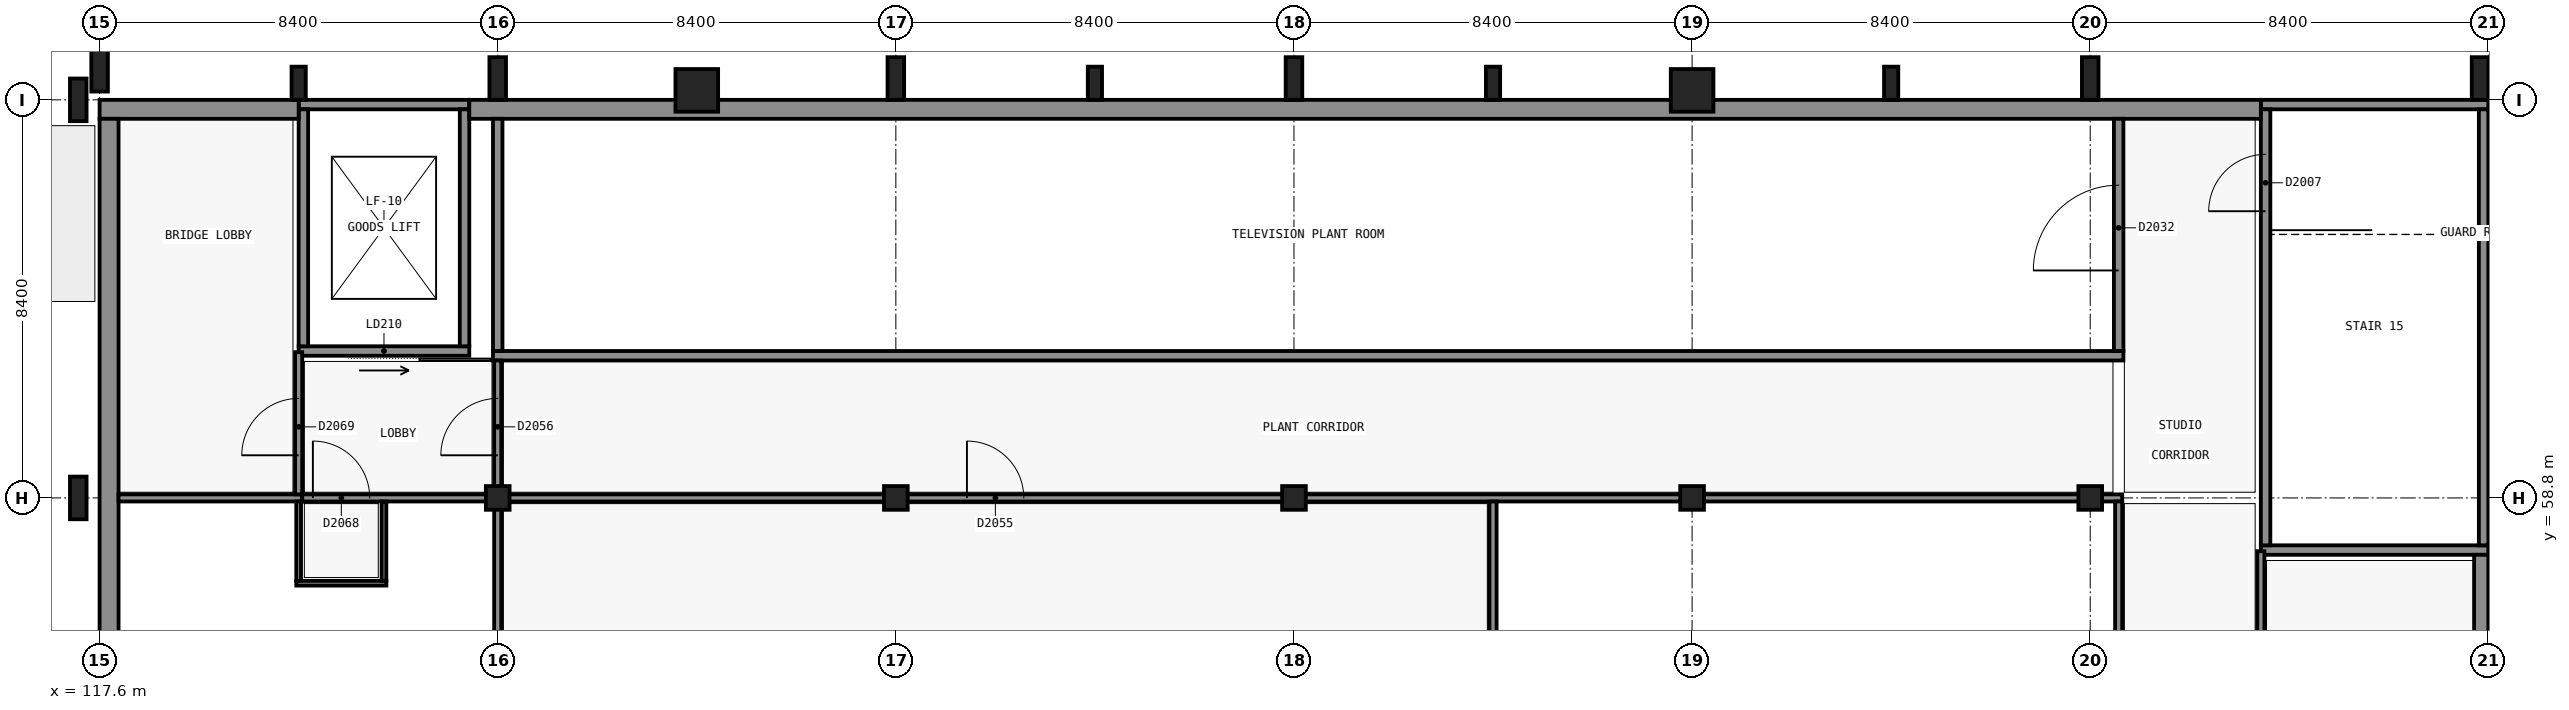
"""IFC4 building model, lengths in metres.
Left out: names, types, materials, properties, quantities, classifications, styles, units other than length and angle.
Written with IfcOpenShell. Run it as: python <this file> out.ifc"""

import sys

from ifc_helpers import new_model, si_unit, direction, frame, frame_2d, origin, origin_2d, place, context, subcontext, project, spatial, rectangle, extrude, element, fill, save


model = new_model("IFC4")
c1 = context("Model", 3, precision=1e-05, world=origin(), true_north=direction((0.0, 1.0)))
c2 = subcontext(c1, "Body", "Model", "MODEL_VIEW")
j1 = project(units=[si_unit("LENGTHUNIT", "METRE"), si_unit("PLANEANGLEUNIT", "RADIAN")], contexts=[c1])
p1 = place(None, origin())
s1 = spatial("IfcSite", under=j1, at=p1, CompositionType="ELEMENT")
p2 = place(p1, origin())
s2 = spatial("IfcBuilding", under=s1, at=p2, CompositionType="ELEMENT")
p3 = place(p2, frame((0.0, 0.0, 10.2)))
s3 = spatial("IfcBuildingStorey", under=s2, at=p3, CompositionType="ELEMENT", Elevation=10.2)
for number, where, z_axis, x_axis in (
    (1, (168.0, 57.7, 0.0), (0.0, 0.0, 1.0), (-1.0, 0.0, 0.0)),
    (2, (163.2, 67.1, 0.0), (0.0, 0.0, 1.0), (1.0, 0.0, 0.0)),
):
    element("IfcWall", number, at=place(p3, frame(where, z_axis=z_axis, x_axis=x_axis)), inside=s3, PredefinedType="SHEAR", context=c2, shape_type="SweptSolid", body=[
        extrude(rectangle(XDim=4.8, YDim=0.2, at=frame_2d((2.4, 0.0))), origin(), (0.0, 0.0, 1.0), 4.8),
    ])
p4 = place(p3, frame((163.3, 57.8, 0.0), z_axis=(0.0, 0.0, 1.0), x_axis=(0.0, 1.0, 0.0)))
e3 = element("IfcWall", 3, at=p4, inside=s3, PredefinedType="SHEAR", context=c2, shape_type="SweptSolid", body=[
    extrude(rectangle(XDim=9.2, YDim=0.2, at=frame_2d((4.6, 0.0))), origin(), (0.0, 0.0, 1.0), 4.8),
])
p5 = place(p4, frame((7.05, 0.0, 0.0)))
e4 = element("IfcOpeningElement", 4, at=p5, cuts=e3, PredefinedType="OPENING", context=c2, shape_type="SweptSolid", body=[
    extrude(rectangle(XDim=1.2, YDim=2.1, at=frame_2d((0.6, 1.05))), frame((0.0, 0.11, 0.0), z_axis=(0.0, -1.0, 0.0), x_axis=(1.0, 0.0, 0.0)), (0.0, 0.0, 1.0), 0.22),
])
p6 = place(p3, frame((167.9, 67.0, 0.0), z_axis=(0.0, 0.0, 1.0), x_axis=(0.0, -1.0, 0.0)))
e5 = element("IfcWall", 5, at=p6, inside=s3, PredefinedType="SHEAR", context=c2, shape_type="SweptSolid", body=[
    extrude(rectangle(XDim=9.2, YDim=0.2, at=frame_2d((4.6, 0.0))), origin(), (0.0, 0.0, 1.0), 4.8),
])
p7 = place(p3, frame((125.4, 61.9, 0.0), z_axis=(0.0, 0.0, 1.0), x_axis=(-1.0, 0.0, 0.0)))
e6 = element("IfcWall", 6, at=p7, inside=s3, PredefinedType="SHEAR", context=c2, shape_type="SweptSolid", body=[
    extrude(rectangle(XDim=3.6, YDim=0.2, at=frame_2d((1.8, 0.0))), origin(), (0.0, 0.0, 1.0), 4.8),
])
p8 = place(p7, frame((1.05, 0.0, 0.0)))
e7 = element("IfcOpeningElement", 7, at=p8, cuts=e6, PredefinedType="OPENING", context=c2, shape_type="SweptSolid", body=[
    extrude(rectangle(XDim=1.5, YDim=2.3, at=frame_2d((0.75, 1.15))), frame((0.0, 0.11, 0.0), z_axis=(0.0, -1.0, 0.0), x_axis=(1.0, 0.0, 0.0)), (0.0, 0.0, 1.0), 0.22),
])
p9 = place(p3, frame((121.8, 67.1, 0.0), z_axis=(0.0, 0.0, 1.0), x_axis=(1.0, 0.0, 0.0)))
e8 = element("IfcWall", 8, at=p9, inside=s3, PredefinedType="SHEAR", context=c2, shape_type="SweptSolid", body=[
    extrude(rectangle(XDim=3.6, YDim=0.2, at=frame_2d((1.8, 0.0))), origin(), (0.0, 0.0, 1.0), 4.8),
])
for number, where, z_axis, x_axis in (
    (9, (121.9, 62.0, 0.0), (0.0, 0.0, 1.0), (0.0, 1.0, 0.0)),
    (10, (125.3, 67.0, 0.0), (0.0, 0.0, 1.0), (0.0, -1.0, 0.0)),
):
    element("IfcWall", number, at=place(p3, frame(where, z_axis=z_axis, x_axis=x_axis)), inside=s3, PredefinedType="SHEAR", context=c2, shape_type="SweptSolid", body=[
        extrude(rectangle(XDim=5.0, YDim=0.2, at=frame_2d((2.5, 0.0))), origin(), (0.0, 0.0, 1.0), 4.8),
    ])
p10 = place(p3, frame((167.85, 57.6, 0.0), z_axis=(0.0, 0.0, 1.0), x_axis=(0.0, -1.0, 0.0)))
e11 = element("IfcWall", 11, at=p10, inside=s3, PredefinedType="SOLIDWALL", context=c2, shape_type="SweptSolid", body=[
    extrude(rectangle(XDim=14.4, YDim=0.3, at=frame_2d((7.2, 0.0))), origin(), (0.0, 0.0, 1.0), 4.8),
])
p11 = place(p3, frame((117.6, 67.0, 0.0), z_axis=(0.0, 0.0, 1.0), x_axis=(1.0, 0.0, 0.0)))
e12 = element("IfcWall", 12, at=p11, inside=s3, PredefinedType="SHEAR", context=c2, shape_type="SweptSolid", body=[
    extrude(rectangle(XDim=4.2, YDim=0.4, at=frame_2d((2.1, 0.0))), origin(), (0.0, 0.0, 1.0), 4.8),
])
p12 = place(p3, frame((125.4, 67.0, 0.0), z_axis=(0.0, 0.0, 1.0), x_axis=(1.0, 0.0, 0.0)))
e13 = element("IfcWall", 13, at=p12, inside=s3, PredefinedType="SHEAR", context=c2, shape_type="SweptSolid", body=[
    extrude(rectangle(XDim=37.8, YDim=0.4, at=frame_2d((18.9, 0.0))), origin(), (0.0, 0.0, 1.0), 4.8),
])
p13 = place(p3, frame((117.8, 43.2, 0.0), z_axis=(0.0, 0.0, 1.0), x_axis=(0.0, 1.0, 0.0)))
e14 = element("IfcWall", 14, at=p13, inside=s3, PredefinedType="SHEAR", context=c2, shape_type="SweptSolid", body=[
    extrude(rectangle(XDim=23.6, YDim=0.4, at=frame_2d((11.8, 0.0))), origin(), (0.0, 0.0, 1.0), 4.8),
])
for number, where, z_axis, x_axis in (
    (15, (126.0, 58.8, 0.0), (0.0, 0.0, 1.0), (1.0, 0.0, 0.0)),
    (16, (134.4, 58.8, 0.0), (0.0, 0.0, 1.0), (1.0, 0.0, 0.0)),
    (17, (142.8, 58.8, 0.0), (0.0, 0.0, 1.0), (1.0, 0.0, 0.0)),
    (18, (151.2, 58.8, 0.0), (0.0, 0.0, 1.0), (1.0, 0.0, 0.0)),
    (19, (159.6, 58.8, 0.0), (0.0, 0.0, 1.0), (1.0, 0.0, 0.0)),
):
    element("IfcColumn", number, at=place(p3, frame(where, z_axis=z_axis, x_axis=x_axis)), inside=s3, PredefinedType="COLUMN", context=c2, shape_type="SweptSolid", body=[
        extrude(rectangle(XDim=0.5, YDim=0.5, at=origin_2d()), origin(), (0.0, 0.0, 1.0), 4.8),
    ])
for number, where, z_axis, x_axis in (
    (20, (130.2, 67.4, 3.8), (0.0, 0.0, 1.0), (1.0, 0.0, 0.0)),
    (21, (151.2, 67.4, 3.8), (0.0, 0.0, 1.0), (1.0, 0.0, 0.0)),
):
    element("IfcColumn", number, at=place(p3, frame(where, z_axis=z_axis, x_axis=x_axis)), inside=s3, PredefinedType="COLUMN", context=c2, shape_type="SweptSolid", body=[
        extrude(rectangle(XDim=0.9, YDim=0.9, at=origin_2d()), origin(), (0.0, 0.0, 1.0), 1.0),
    ])
p14 = place(p3, frame((117.6, 67.825, 0.0), z_axis=(0.0, 0.0, 1.0), x_axis=(1.0, 0.0, 0.0)))
e22 = element("IfcColumn", 22, at=p14, inside=s3, PredefinedType="PILASTER", context=c2, shape_type="SweptSolid", body=[
    extrude(rectangle(XDim=0.35, YDim=0.9, at=origin_2d()), origin(), (0.0, 0.0, 1.0), 4.8),
])
p15 = place(p3, frame((121.8, 67.55, 0.0), z_axis=(0.0, 0.0, 1.0), x_axis=(1.0, 0.0, 0.0)))
e23 = element("IfcColumn", 23, at=p15, inside=s3, PredefinedType="PILASTER", context=c2, shape_type="SweptSolid", body=[
    extrude(rectangle(XDim=0.3, YDim=0.7, at=origin_2d()), origin(), (0.0, 0.0, 1.0), 4.8),
])
for number, where, z_axis, x_axis in (
    (24, (126.0, 67.65, 0.0), (0.0, 0.0, 1.0), (1.0, 0.0, 0.0)),
    (25, (134.4, 67.65, 0.0), (0.0, 0.0, 1.0), (1.0, 0.0, 0.0)),
):
    element("IfcColumn", number, at=place(p3, frame(where, z_axis=z_axis, x_axis=x_axis)), inside=s3, PredefinedType="PILASTER", context=c2, shape_type="SweptSolid", body=[
        extrude(rectangle(XDim=0.35, YDim=0.9, at=origin_2d()), origin(), (0.0, 0.0, 1.0), 4.8),
    ])
p16 = place(p3, frame((138.6, 67.55, 0.0), z_axis=(0.0, 0.0, 1.0), x_axis=(1.0, 0.0, 0.0)))
e26 = element("IfcColumn", 26, at=p16, inside=s3, PredefinedType="PILASTER", context=c2, shape_type="SweptSolid", body=[
    extrude(rectangle(XDim=0.3, YDim=0.7, at=origin_2d()), origin(), (0.0, 0.0, 1.0), 4.8),
])
p17 = place(p3, frame((142.8, 67.65, 0.0), z_axis=(0.0, 0.0, 1.0), x_axis=(1.0, 0.0, 0.0)))
e27 = element("IfcColumn", 27, at=p17, inside=s3, PredefinedType="PILASTER", context=c2, shape_type="SweptSolid", body=[
    extrude(rectangle(XDim=0.35, YDim=0.9, at=origin_2d()), origin(), (0.0, 0.0, 1.0), 4.8),
])
for number, where, z_axis, x_axis in (
    (28, (147.0, 67.55, 0.0), (0.0, 0.0, 1.0), (1.0, 0.0, 0.0)),
    (29, (155.4, 67.55, 0.0), (0.0, 0.0, 1.0), (1.0, 0.0, 0.0)),
):
    element("IfcColumn", number, at=place(p3, frame(where, z_axis=z_axis, x_axis=x_axis)), inside=s3, PredefinedType="PILASTER", context=c2, shape_type="SweptSolid", body=[
        extrude(rectangle(XDim=0.3, YDim=0.7, at=origin_2d()), origin(), (0.0, 0.0, 1.0), 4.8),
    ])
for number, where, z_axis, x_axis in (
    (30, (159.6, 67.65, 0.0), (0.0, 0.0, 1.0), (1.0, 0.0, 0.0)),
    (31, (167.825, 67.65, 0.0), (0.0, 0.0, 1.0), (1.0, 0.0, 0.0)),
    (32, (117.15, 58.8, 0.0), (0.0, 0.0, 1.0), (0.0, 1.0, 0.0)),
    (33, (117.15, 67.2, 0.0), (0.0, 0.0, 1.0), (0.0, 1.0, 0.0)),
):
    element("IfcColumn", number, at=place(p3, frame(where, z_axis=z_axis, x_axis=x_axis)), inside=s3, PredefinedType="PILASTER", context=c2, shape_type="SweptSolid", body=[
        extrude(rectangle(XDim=0.35, YDim=0.9, at=origin_2d()), origin(), (0.0, 0.0, 1.0), 4.8),
    ])
p18 = place(p3, frame((125.9, 61.8, 0.0), z_axis=(0.0, 0.0, 1.0), x_axis=(1.0, 0.0, 0.0)))
e34 = element("IfcWall", 34, at=p18, inside=s3, PredefinedType="SOLIDWALL", context=c2, shape_type="SweptSolid", body=[
    extrude(rectangle(XDim=34.4, YDim=0.2, at=frame_2d((17.2, 0.0))), origin(), (0.0, 0.0, 1.0), 4.5),
])
p19 = place(p3, frame((160.2, 61.9, 0.0), z_axis=(0.0, 0.0, 1.0), x_axis=(0.0, 1.0, 0.0)))
e35 = element("IfcWall", 35, at=p19, inside=s3, PredefinedType="SOLIDWALL", context=c2, shape_type="SweptSolid", body=[
    extrude(rectangle(XDim=4.9, YDim=0.2, at=frame_2d((2.45, 0.0))), origin(), (0.0, 0.0, 1.0), 4.5),
])
p20 = place(p19, frame((1.7, 0.0, 0.0)))
e36 = element("IfcOpeningElement", 36, at=p20, cuts=e35, PredefinedType="OPENING", context=c2, shape_type="SweptSolid", body=[
    extrude(rectangle(XDim=1.8, YDim=2.1, at=frame_2d((0.9, 1.05))), frame((0.0, 0.11, 0.0), z_axis=(0.0, -1.0, 0.0), x_axis=(1.0, 0.0, 0.0)), (0.0, 0.0, 1.0), 0.22),
])
p21 = place(p3, frame((126.0, 61.9, 0.0), z_axis=(0.0, 0.0, 1.0), x_axis=(0.0, 1.0, 0.0)))
e37 = element("IfcWall", 37, at=p21, inside=s3, PredefinedType="SHEAR", context=c2, shape_type="SweptSolid", body=[
    extrude(rectangle(XDim=4.9, YDim=0.2, at=frame_2d((2.45, 0.0))), origin(), (0.0, 0.0, 1.0), 4.5),
])
p22 = place(p3, frame((118.0, 58.8, 0.0), z_axis=(0.0, 0.0, 1.0), x_axis=(1.0, 0.0, 0.0)))
e38 = element("IfcWall", 38, at=p22, inside=s3, PredefinedType="PARTITIONING", context=c2, shape_type="SweptSolid", body=[
    extrude(rectangle(XDim=3.875, YDim=0.15, at=frame_2d((1.938, 0.0))), origin(), (0.0, 0.0, 1.0), 4.5),
])
p23 = place(p3, frame((125.925, 58.8, 0.0), z_axis=(0.0, 0.0, 1.0), x_axis=(1.0, 0.0, 0.0)))
e39 = element("IfcWall", 39, at=p23, inside=s3, PredefinedType="PARTITIONING", context=c2, shape_type="SweptSolid", body=[
    extrude(rectangle(XDim=34.35, YDim=0.15, at=frame_2d((17.175, 0.0))), origin(), (0.0, 0.0, 1.0), 4.5),
])
p24 = place(p23, frame((9.975, 0.0, 0.0)))
e40 = element("IfcOpeningElement", 40, at=p24, cuts=e39, PredefinedType="OPENING", context=c2, shape_type="SweptSolid", body=[
    extrude(rectangle(XDim=1.2, YDim=2.1, at=frame_2d((0.6, 1.05))), frame((0.0, 0.085, 0.0), z_axis=(0.0, -1.0, 0.0), x_axis=(1.0, 0.0, 0.0)), (0.0, 0.0, 1.0), 0.17),
])
p25 = place(p3, frame((121.875, 58.8, 0.0), z_axis=(0.0, 0.0, 1.0), x_axis=(1.0, 0.0, 0.0)))
e41 = element("IfcWall", 41, at=p25, inside=s3, PredefinedType="SOLIDWALL", context=c2, shape_type="SweptSolid", body=[
    extrude(rectangle(XDim=4.05, YDim=0.15, at=frame_2d((2.025, 0.0))), origin(), (0.0, 0.0, 1.0), 4.5),
])
p26 = place(p25, frame((0.225, 0.0, 0.0)))
e42 = element("IfcOpeningElement", 42, at=p26, cuts=e41, PredefinedType="OPENING", context=c2, shape_type="SweptSolid", body=[
    extrude(rectangle(XDim=1.2, YDim=2.1, at=frame_2d((0.6, 1.05))), frame((0.0, 0.085, 0.0), z_axis=(0.0, -1.0, 0.0), x_axis=(1.0, 0.0, 0.0)), (0.0, 0.0, 1.0), 0.17),
])
for number, where, z_axis, x_axis in (
    (43, (126.0, 42.125, 0.0), (0.0, 0.0, 1.0), (0.0, 1.0, 0.0)),
    (44, (147.0, 42.125, 0.0), (0.0, 0.0, 1.0), (0.0, 1.0, 0.0)),
):
    element("IfcWall", number, at=place(p3, frame(where, z_axis=z_axis, x_axis=x_axis)), inside=s3, PredefinedType="PARTITIONING", context=c2, shape_type="SweptSolid", body=[
        extrude(rectangle(XDim=16.6, YDim=0.15, at=frame_2d((8.3, 0.0))), origin(), (0.0, 0.0, 1.0), 4.5),
    ])
p27 = place(p3, frame((160.2, 42.075, 0.0), z_axis=(0.0, 0.0, 1.0), x_axis=(0.0, 1.0, 0.0)))
e45 = element("IfcWall", 45, at=p27, inside=s3, PredefinedType="PARTITIONING", context=c2, shape_type="SweptSolid", body=[
    extrude(rectangle(XDim=16.65, YDim=0.15, at=frame_2d((8.325, 0.0))), origin(), (0.0, 0.0, 1.0), 4.5),
])
p28 = place(p3, frame((163.2, 43.125, 0.0), z_axis=(0.0, 0.0, 1.0), x_axis=(0.0, 1.0, 0.0)))
e46 = element("IfcWall", 46, at=p28, inside=s3, PredefinedType="PARTITIONING", context=c2, shape_type="SweptSolid", body=[
    extrude(rectangle(XDim=14.55, YDim=0.15, at=frame_2d((7.275, 0.0))), origin(), (0.0, 0.0, 1.0), 4.5),
])
p29 = place(p28, frame((6.775, 0.0, 0.0)))
e47 = element("IfcOpeningElement", 47, at=p29, cuts=e46, PredefinedType="OPENING", context=c2, shape_type="SweptSolid", body=[
    extrude(rectangle(XDim=1.0, YDim=2.1, at=frame_2d((0.5, 1.05))), frame((0.0, 0.085, 0.0), z_axis=(0.0, -1.0, 0.0), x_axis=(1.0, 0.0, 0.0)), (0.0, 0.0, 1.0), 0.17),
])
p30 = place(p3, frame((121.8, 58.875, 0.0), z_axis=(0.0, 0.0, 1.0), x_axis=(0.0, 1.0, 0.0)))
e48 = element("IfcWall", 48, at=p30, inside=s3, PredefinedType="SOLIDWALL", context=c2, shape_type="SweptSolid", body=[
    extrude(rectangle(XDim=3.0, YDim=0.15, at=frame_2d((1.5, 0.0))), origin(), (0.0, 0.0, 1.0), 4.5),
])
p31 = place(p30, frame((0.825, 0.0, 0.0)))
e49 = element("IfcOpeningElement", 49, at=p31, cuts=e48, PredefinedType="OPENING", context=c2, shape_type="SweptSolid", body=[
    extrude(rectangle(XDim=1.2, YDim=2.1, at=frame_2d((0.6, 1.05))), frame((0.0, 0.085, 0.0), z_axis=(0.0, -1.0, 0.0), x_axis=(1.0, 0.0, 0.0)), (0.0, 0.0, 1.0), 0.17),
])
p32 = place(p3, frame((126.0, 58.875, 0.0), z_axis=(0.0, 0.0, 1.0), x_axis=(0.0, 1.0, 0.0)))
e50 = element("IfcWall", 50, at=p32, inside=s3, PredefinedType="SOLIDWALL", context=c2, shape_type="SweptSolid", body=[
    extrude(rectangle(XDim=2.825, YDim=0.15, at=frame_2d((1.413, 0.0))), origin(), (0.0, 0.0, 1.0), 4.5),
])
p33 = place(p32, frame((0.825, 0.0, 0.0)))
e51 = element("IfcOpeningElement", 51, at=p33, cuts=e50, PredefinedType="OPENING", context=c2, shape_type="SweptSolid", body=[
    extrude(rectangle(XDim=1.2, YDim=2.1, at=frame_2d((0.6, 1.05))), frame((0.0, 0.085, 0.0), z_axis=(0.0, -1.0, 0.0), x_axis=(1.0, 0.0, 0.0)), (0.0, 0.0, 1.0), 0.17),
])
p34 = place(p3, frame((121.75, 57.0, 0.0), z_axis=(0.0, 0.0, 1.0), x_axis=(1.0, 0.0, 0.0)))
e52 = element("IfcWall", 52, at=p34, inside=s3, PredefinedType="PARTITIONING", context=c2, shape_type="SweptSolid", body=[
    extrude(rectangle(XDim=1.9, YDim=0.1, at=frame_2d((0.95, 0.0))), origin(), (0.0, 0.0, 1.0), 4.5),
])
for number, where, z_axis, x_axis in (
    (53, (121.8, 57.05, 0.0), (0.0, 0.0, 1.0), (0.0, 1.0, 0.0)),
    (54, (123.6, 57.05, 0.0), (0.0, 0.0, 1.0), (0.0, 1.0, 0.0)),
):
    element("IfcWall", number, at=place(p3, frame(where, z_axis=z_axis, x_axis=x_axis)), inside=s3, PredefinedType="PARTITIONING", context=c2, shape_type="SweptSolid", body=[
        extrude(rectangle(XDim=1.675, YDim=0.1, at=frame_2d((0.837, 0.0))), origin(), (0.0, 0.0, 1.0), 4.5),
    ])
p35 = place(p8, origin())
e55 = element("IfcDoor", 55, at=p35, inside=s3, OperationType="SLIDING_TO_LEFT", PredefinedType="DOOR", context=c2, shape_type="SweptSolid", body=[
    extrude(rectangle(XDim=1.5, YDim=2.3, at=frame_2d((0.75, 1.15))), frame((0.0, 0.025, 0.0), z_axis=(0.0, -1.0, 0.0), x_axis=(1.0, 0.0, 0.0)), (0.0, 0.0, 1.0), 0.05),
])
fill(e7, e55)
p36 = place(p5, origin())
e56 = element("IfcDoor", 56, at=p36, inside=s3, OperationType="SINGLE_SWING_RIGHT", PredefinedType="DOOR", context=c2, shape_type="SweptSolid", body=[
    extrude(rectangle(XDim=1.2, YDim=2.1, at=frame_2d((0.6, 1.05))), frame((0.0, 0.025, 0.0), z_axis=(0.0, -1.0, 0.0), x_axis=(1.0, 0.0, 0.0)), (0.0, 0.0, 1.0), 0.05),
])
fill(e4, e56)
p37 = place(p20, origin())
e57 = element("IfcDoor", 57, at=p37, inside=s3, OperationType="DOUBLE_DOOR_SINGLE_SWING", PredefinedType="DOOR", context=c2, shape_type="SweptSolid", body=[
    extrude(rectangle(XDim=1.8, YDim=2.1, at=frame_2d((0.9, 1.05))), frame((0.0, 0.025, 0.0), z_axis=(0.0, -1.0, 0.0), x_axis=(1.0, 0.0, 0.0)), (0.0, 0.0, 1.0), 0.05),
])
fill(e36, e57)
p38 = place(p24, origin())
e58 = element("IfcDoor", 58, at=p38, inside=s3, OperationType="SINGLE_SWING_RIGHT", PredefinedType="DOOR", context=c2, shape_type="SweptSolid", body=[
    extrude(rectangle(XDim=1.2, YDim=2.1, at=frame_2d((0.6, 1.05))), frame((0.0, 0.025, 0.0), z_axis=(0.0, -1.0, 0.0), x_axis=(1.0, 0.0, 0.0)), (0.0, 0.0, 1.0), 0.05),
])
fill(e40, e58)
p39 = place(p33, origin())
e59 = element("IfcDoor", 59, at=p39, inside=s3, OperationType="SINGLE_SWING_RIGHT", PredefinedType="DOOR", context=c2, shape_type="SweptSolid", body=[
    extrude(rectangle(XDim=1.2, YDim=2.1, at=frame_2d((0.6, 1.05))), frame((0.0, 0.025, 0.0), z_axis=(0.0, -1.0, 0.0), x_axis=(1.0, 0.0, 0.0)), (0.0, 0.0, 1.0), 0.05),
])
fill(e51, e59)
p40 = place(p26, origin())
e60 = element("IfcDoor", 60, at=p40, inside=s3, OperationType="SINGLE_SWING_LEFT", PredefinedType="DOOR", context=c2, shape_type="SweptSolid", body=[
    extrude(rectangle(XDim=1.2, YDim=2.1, at=frame_2d((0.6, 1.05))), frame((0.0, 0.025, 0.0), z_axis=(0.0, -1.0, 0.0), x_axis=(1.0, 0.0, 0.0)), (0.0, 0.0, 1.0), 0.05),
])
fill(e42, e60)
p41 = place(p31, origin())
e61 = element("IfcDoor", 61, at=p41, inside=s3, OperationType="SINGLE_SWING_RIGHT", PredefinedType="DOOR", context=c2, shape_type="SweptSolid", body=[
    extrude(rectangle(XDim=1.2, YDim=2.1, at=frame_2d((0.6, 1.05))), frame((0.0, 0.025, 0.0), z_axis=(0.0, -1.0, 0.0), x_axis=(1.0, 0.0, 0.0)), (0.0, 0.0, 1.0), 0.05),
])
fill(e49, e61)
save(model, sys.argv[1])
